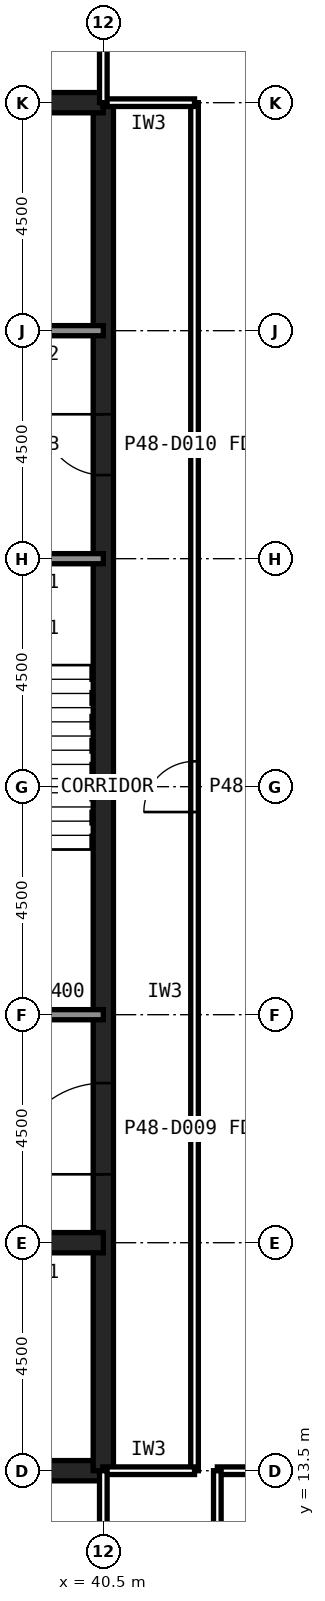
"""IFC4 building model, lengths in metres.
Left out: names, types, materials, properties, quantities, classifications, styles, units other than length and angle.
Written with IfcOpenShell. Run it as: python <this file> out.ifc"""

import sys

from ifc_helpers import new_model, si_unit, direction, frame, frame_2d, origin, place, context, subcontext, project, spatial, rectangle, extrude, element, fill, save


model = new_model("IFC4")
c1 = context("Model", 3, precision=1e-05, world=origin(), true_north=direction((0.0, 1.0)))
c2 = subcontext(c1, "Body", "Model", "MODEL_VIEW")
j1 = project(units=[si_unit("LENGTHUNIT", "METRE"), si_unit("PLANEANGLEUNIT", "RADIAN")], contexts=[c1])
p1 = place(None, origin())
s1 = spatial("IfcSite", under=j1, at=p1, CompositionType="ELEMENT")
p2 = place(p1, origin())
s2 = spatial("IfcBuilding", under=s1, at=p2, CompositionType="ELEMENT")
p3 = place(p2, frame((0.0, 0.0, 205.6)))
s3 = spatial("IfcBuildingStorey", under=s2, at=p3, CompositionType="ELEMENT", Elevation=205.6)
p4 = place(p3, frame((13.5, 13.5, 0.0), z_axis=(0.0, 0.0, 1.0), x_axis=(1.0, 0.0, 0.0)))
e1 = element("IfcWall", 1, at=p4, inside=s3, PredefinedType="SHEAR", context=c2, shape_type="SweptSolid", body=[
    extrude(rectangle(XDim=27.0, YDim=0.4, at=frame_2d((13.5, 0.0))), origin(), (0.0, 0.0, 1.0), 5.0),
])
p5 = place(p3, frame((40.5, 13.5, 0.0), z_axis=(0.0, 0.0, 1.0), x_axis=(0.0, 1.0, 0.0)))
e2 = element("IfcWall", 2, at=p5, inside=s3, PredefinedType="SHEAR", context=c2, shape_type="SweptSolid", body=[
    extrude(rectangle(XDim=27.0, YDim=0.4, at=frame_2d((13.5, 0.0))), origin(), (0.0, 0.0, 1.0), 5.0),
])
p6 = place(p5, frame((5.85, 0.0, 0.0)))
e3 = element("IfcOpeningElement", 3, at=p6, cuts=e2, PredefinedType="OPENING", context=c2, shape_type="SweptSolid", body=[
    extrude(rectangle(XDim=1.8, YDim=2.1, at=frame_2d((0.9, 1.05))), frame((0.0, 0.21, 0.0), z_axis=(0.0, -1.0, 0.0), x_axis=(1.0, 0.0, 0.0)), (0.0, 0.0, 1.0), 0.42),
])
p7 = place(p5, frame((19.65, 0.0, 0.0)))
e4 = element("IfcOpeningElement", 4, at=p7, cuts=e2, PredefinedType="OPENING", context=c2, shape_type="SweptSolid", body=[
    extrude(rectangle(XDim=1.2, YDim=2.1, at=frame_2d((0.6, 1.05))), frame((0.0, 0.21, 0.0), z_axis=(0.0, -1.0, 0.0), x_axis=(1.0, 0.0, 0.0)), (0.0, 0.0, 1.0), 0.42),
])
p8 = place(p3, frame((40.5, 40.5, 0.0), z_axis=(0.0, 0.0, 1.0), x_axis=(-1.0, 0.0, 0.0)))
e5 = element("IfcWall", 5, at=p8, inside=s3, PredefinedType="SHEAR", context=c2, shape_type="SweptSolid", body=[
    extrude(rectangle(XDim=27.0, YDim=0.4, at=frame_2d((13.5, 0.0))), origin(), (0.0, 0.0, 1.0), 5.0),
])
p9 = place(p3, frame((13.5, 18.0, 0.0), z_axis=(0.0, 0.0, 1.0), x_axis=(1.0, 0.0, 0.0)))
e6 = element("IfcWall", 6, at=p9, inside=s3, PredefinedType="SHEAR", context=c2, shape_type="SweptSolid", body=[
    extrude(rectangle(XDim=27.0, YDim=0.4, at=frame_2d((13.5, 0.0))), origin(), (0.0, 0.0, 1.0), 5.0),
])
p10 = place(p9, frame((24.3, 0.0, 0.0)))
e7 = element("IfcOpeningElement", 7, at=p10, cuts=e6, PredefinedType="OPENING", context=c2, shape_type="SweptSolid", body=[
    extrude(rectangle(XDim=0.9, YDim=2.1, at=frame_2d((0.45, 1.05))), frame((0.0, 0.21, 0.0), z_axis=(0.0, -1.0, 0.0), x_axis=(1.0, 0.0, 0.0)), (0.0, 0.0, 1.0), 0.42),
])
p11 = place(p9, frame((5.45, 0.0, 0.0)))
e8 = element("IfcOpeningElement", 8, at=p11, cuts=e6, PredefinedType="OPENING", context=c2, shape_type="SweptSolid", body=[
    extrude(rectangle(XDim=1.1, YDim=2.1, at=frame_2d((0.55, 1.05))), frame((0.0, 0.21, 0.0), z_axis=(0.0, -1.0, 0.0), x_axis=(1.0, 0.0, 0.0)), (0.0, 0.0, 1.0), 0.42),
])
p12 = place(p9, frame((8.45, 0.0, 0.0)))
e9 = element("IfcOpeningElement", 9, at=p12, cuts=e6, PredefinedType="OPENING", context=c2, shape_type="SweptSolid", body=[
    extrude(rectangle(XDim=1.1, YDim=2.1, at=frame_2d((0.55, 1.05))), frame((0.0, 0.21, 0.0), z_axis=(0.0, -1.0, 0.0), x_axis=(1.0, 0.0, 0.0)), (0.0, 0.0, 1.0), 0.42),
])
p13 = place(p9, frame((11.45, 0.0, 0.0)))
e10 = element("IfcOpeningElement", 10, at=p13, cuts=e6, PredefinedType="OPENING", context=c2, shape_type="SweptSolid", body=[
    extrude(rectangle(XDim=1.1, YDim=2.1, at=frame_2d((0.55, 1.05))), frame((0.0, 0.21, 0.0), z_axis=(0.0, -1.0, 0.0), x_axis=(1.0, 0.0, 0.0)), (0.0, 0.0, 1.0), 0.42),
])
p14 = place(p9, frame((14.45, 0.0, 0.0)))
e11 = element("IfcOpeningElement", 11, at=p14, cuts=e6, PredefinedType="OPENING", context=c2, shape_type="SweptSolid", body=[
    extrude(rectangle(XDim=1.1, YDim=2.1, at=frame_2d((0.55, 1.05))), frame((0.0, 0.21, 0.0), z_axis=(0.0, -1.0, 0.0), x_axis=(1.0, 0.0, 0.0)), (0.0, 0.0, 1.0), 0.42),
])
p15 = place(p9, frame((17.45, 0.0, 0.0)))
e12 = element("IfcOpeningElement", 12, at=p15, cuts=e6, PredefinedType="OPENING", context=c2, shape_type="SweptSolid", body=[
    extrude(rectangle(XDim=1.1, YDim=2.1, at=frame_2d((0.55, 1.05))), frame((0.0, 0.21, 0.0), z_axis=(0.0, -1.0, 0.0), x_axis=(1.0, 0.0, 0.0)), (0.0, 0.0, 1.0), 0.42),
])
p16 = place(p9, frame((20.45, 0.0, 0.0)))
e13 = element("IfcOpeningElement", 13, at=p16, cuts=e6, PredefinedType="OPENING", context=c2, shape_type="SweptSolid", body=[
    extrude(rectangle(XDim=1.1, YDim=2.1, at=frame_2d((0.55, 1.05))), frame((0.0, 0.21, 0.0), z_axis=(0.0, -1.0, 0.0), x_axis=(1.0, 0.0, 0.0)), (0.0, 0.0, 1.0), 0.42),
])
p17 = place(p9, frame((1.6, 0.0, 0.0)))
e14 = element("IfcOpeningElement", 14, at=p17, cuts=e6, PredefinedType="OPENING", context=c2, shape_type="SweptSolid", body=[
    extrude(rectangle(XDim=1.3, YDim=2.2, at=frame_2d((0.65, 1.1))), frame((0.0, 0.21, 0.0), z_axis=(0.0, -1.0, 0.0), x_axis=(1.0, 0.0, 0.0)), (0.0, 0.0, 1.0), 0.42),
])
p18 = place(p3, frame((13.5, 36.0, 0.0), z_axis=(0.0, 0.0, 1.0), x_axis=(1.0, 0.0, 0.0)))
e15 = element("IfcWall", 15, at=p18, inside=s3, PredefinedType="SOLIDWALL", context=c2, shape_type="SweptSolid", body=[
    extrude(rectangle(XDim=27.0, YDim=0.2, at=frame_2d((13.5, 0.0))), origin(), (0.0, 0.0, 1.0), 4.84),
])
p19 = place(p18, frame((1.8, 0.0, 0.0)))
e16 = element("IfcOpeningElement", 16, at=p19, cuts=e15, PredefinedType="OPENING", context=c2, shape_type="SweptSolid", body=[
    extrude(rectangle(XDim=0.9, YDim=2.1, at=frame_2d((0.45, 1.05))), frame((0.0, 0.11, 0.0), z_axis=(0.0, -1.0, 0.0), x_axis=(1.0, 0.0, 0.0)), (0.0, 0.0, 1.0), 0.22),
])
p20 = place(p18, frame((5.55, 0.0, 0.0)))
e17 = element("IfcOpeningElement", 17, at=p20, cuts=e15, PredefinedType="OPENING", context=c2, shape_type="SweptSolid", body=[
    extrude(rectangle(XDim=0.9, YDim=2.1, at=frame_2d((0.45, 1.05))), frame((0.0, 0.11, 0.0), z_axis=(0.0, -1.0, 0.0), x_axis=(1.0, 0.0, 0.0)), (0.0, 0.0, 1.0), 0.22),
])
p21 = place(p18, frame((14.35, 0.0, 0.0)))
e18 = element("IfcOpeningElement", 18, at=p21, cuts=e15, PredefinedType="OPENING", context=c2, shape_type="SweptSolid", body=[
    extrude(rectangle(XDim=1.3, YDim=2.2, at=frame_2d((0.65, 1.1))), frame((0.0, 0.11, 0.0), z_axis=(0.0, -1.0, 0.0), x_axis=(1.0, 0.0, 0.0)), (0.0, 0.0, 1.0), 0.22),
])
p22 = place(p18, frame((17.35, 0.0, 0.0)))
e19 = element("IfcOpeningElement", 19, at=p22, cuts=e15, PredefinedType="OPENING", context=c2, shape_type="SweptSolid", body=[
    extrude(rectangle(XDim=1.3, YDim=2.2, at=frame_2d((0.65, 1.1))), frame((0.0, 0.11, 0.0), z_axis=(0.0, -1.0, 0.0), x_axis=(1.0, 0.0, 0.0)), (0.0, 0.0, 1.0), 0.22),
])
p23 = place(p18, frame((20.35, 0.0, 0.0)))
e20 = element("IfcOpeningElement", 20, at=p23, cuts=e15, PredefinedType="OPENING", context=c2, shape_type="SweptSolid", body=[
    extrude(rectangle(XDim=1.3, YDim=2.2, at=frame_2d((0.65, 1.1))), frame((0.0, 0.11, 0.0), z_axis=(0.0, -1.0, 0.0), x_axis=(1.0, 0.0, 0.0)), (0.0, 0.0, 1.0), 0.22),
])
p24 = place(p18, frame((24.1, 0.0, 0.0)))
e21 = element("IfcOpeningElement", 21, at=p24, cuts=e15, PredefinedType="OPENING", context=c2, shape_type="SweptSolid", body=[
    extrude(rectangle(XDim=1.3, YDim=2.2, at=frame_2d((0.65, 1.1))), frame((0.0, 0.11, 0.0), z_axis=(0.0, -1.0, 0.0), x_axis=(1.0, 0.0, 0.0)), (0.0, 0.0, 1.0), 0.22),
])
p25 = place(p3, frame((13.5, 22.5, 0.0), z_axis=(0.0, 0.0, 1.0), x_axis=(1.0, 0.0, 0.0)))
e22 = element("IfcWall", 22, at=p25, inside=s3, PredefinedType="SOLIDWALL", context=c2, shape_type="SweptSolid", body=[
    extrude(rectangle(XDim=27.0, YDim=0.2, at=frame_2d((13.5, 0.0))), origin(), (0.0, 0.0, 1.0), 4.84),
])
p26 = place(p25, frame((1.65, 0.0, 0.0)))
e23 = element("IfcOpeningElement", 23, at=p26, cuts=e22, PredefinedType="OPENING", context=c2, shape_type="SweptSolid", body=[
    extrude(rectangle(XDim=1.2, YDim=2.1, at=frame_2d((0.6, 1.05))), frame((0.0, 0.11, 0.0), z_axis=(0.0, -1.0, 0.0), x_axis=(1.0, 0.0, 0.0)), (0.0, 0.0, 1.0), 0.22),
])
p27 = place(p25, frame((6.025, 0.0, 0.0)))
e24 = element("IfcOpeningElement", 24, at=p27, cuts=e22, PredefinedType="OPENING", context=c2, shape_type="SweptSolid", body=[
    extrude(rectangle(XDim=1.0, YDim=2.1, at=frame_2d((0.5, 1.05))), frame((0.0, 0.11, 0.0), z_axis=(0.0, -1.0, 0.0), x_axis=(1.0, 0.0, 0.0)), (0.0, 0.0, 1.0), 0.22),
])
p28 = place(p25, frame((10.525, 0.0, 0.0)))
e25 = element("IfcOpeningElement", 25, at=p28, cuts=e22, PredefinedType="OPENING", context=c2, shape_type="SweptSolid", body=[
    extrude(rectangle(XDim=1.0, YDim=2.1, at=frame_2d((0.5, 1.05))), frame((0.0, 0.11, 0.0), z_axis=(0.0, -1.0, 0.0), x_axis=(1.0, 0.0, 0.0)), (0.0, 0.0, 1.0), 0.22),
])
p29 = place(p25, frame((19.75, 0.0, 0.0)))
e26 = element("IfcOpeningElement", 26, at=p29, cuts=e22, PredefinedType="OPENING", context=c2, shape_type="SweptSolid", body=[
    extrude(rectangle(XDim=1.0, YDim=2.1, at=frame_2d((0.5, 1.05))), frame((0.0, 0.11, 0.0), z_axis=(0.0, -1.0, 0.0), x_axis=(1.0, 0.0, 0.0)), (0.0, 0.0, 1.0), 0.22),
])
p30 = place(p25, frame((15.05, 0.0, 0.0)))
e27 = element("IfcOpeningElement", 27, at=p30, cuts=e22, PredefinedType="OPENING", context=c2, shape_type="SweptSolid", body=[
    extrude(rectangle(XDim=1.4, YDim=2.4, at=frame_2d((0.7, 1.2))), frame((0.0, 0.11, 0.0), z_axis=(0.0, -1.0, 0.0), x_axis=(1.0, 0.0, 0.0)), (0.0, 0.0, 1.0), 0.22),
])
p31 = place(p3, frame((13.5, 31.5, 0.0), z_axis=(0.0, 0.0, 1.0), x_axis=(1.0, 0.0, 0.0)))
e28 = element("IfcWall", 28, at=p31, inside=s3, PredefinedType="SOLIDWALL", context=c2, shape_type="SweptSolid", body=[
    extrude(rectangle(XDim=27.0, YDim=0.2, at=frame_2d((13.5, 0.0))), origin(), (0.0, 0.0, 1.0), 4.84),
])
p32 = place(p31, frame((24.15, 0.0, 0.0)))
e29 = element("IfcOpeningElement", 29, at=p32, cuts=e28, PredefinedType="OPENING", context=c2, shape_type="SweptSolid", body=[
    extrude(rectangle(XDim=1.2, YDim=2.1, at=frame_2d((0.6, 1.05))), frame((0.0, 0.11, 0.0), z_axis=(0.0, -1.0, 0.0), x_axis=(1.0, 0.0, 0.0)), (0.0, 0.0, 1.0), 0.22),
])
p33 = place(p31, frame((15.3, 0.0, 0.0)))
e30 = element("IfcOpeningElement", 30, at=p33, cuts=e28, PredefinedType="OPENING", context=c2, shape_type="SweptSolid", body=[
    extrude(rectangle(XDim=0.9, YDim=2.1, at=frame_2d((0.45, 1.05))), frame((0.0, 0.11, 0.0), z_axis=(0.0, -1.0, 0.0), x_axis=(1.0, 0.0, 0.0)), (0.0, 0.0, 1.0), 0.22),
])
p34 = place(p31, frame((19.8, 0.0, 0.0)))
e31 = element("IfcOpeningElement", 31, at=p34, cuts=e28, PredefinedType="OPENING", context=c2, shape_type="SweptSolid", body=[
    extrude(rectangle(XDim=0.9, YDim=2.1, at=frame_2d((0.45, 1.05))), frame((0.0, 0.11, 0.0), z_axis=(0.0, -1.0, 0.0), x_axis=(1.0, 0.0, 0.0)), (0.0, 0.0, 1.0), 0.22),
])
p35 = place(p3, frame((42.3, 13.5, 0.0), z_axis=(0.0, 0.0, 1.0), x_axis=(0.0, 1.0, 0.0)))
e32 = element("IfcWall", 32, at=p35, inside=s3, PredefinedType="PARTITIONING", context=c2, shape_type="SweptSolid", body=[
    extrude(rectangle(XDim=27.0, YDim=0.15, at=frame_2d((13.5, 0.0))), origin(), (0.0, 0.0, 1.0), 4.84),
])
p36 = place(p35, frame((13.0, 0.0, 0.0)))
e33 = element("IfcOpeningElement", 33, at=p36, cuts=e32, PredefinedType="OPENING", context=c2, shape_type="SweptSolid", body=[
    extrude(rectangle(XDim=1.0, YDim=2.1, at=frame_2d((0.5, 1.05))), frame((0.0, 0.085, 0.0), z_axis=(0.0, -1.0, 0.0), x_axis=(1.0, 0.0, 0.0)), (0.0, 0.0, 1.0), 0.17),
])
for number, where, z_axis, x_axis in (
    (34, (40.49, 13.5, 0.0), (0.0, 0.0, 1.0), (1.0, 0.0, 0.0)),
    (35, (42.3, 40.5, 0.0), (0.0, 0.0, 1.0), (-1.0, 0.0, 0.0)),
):
    element("IfcWall", number, at=place(p3, frame(where, z_axis=z_axis, x_axis=x_axis)), inside=s3, PredefinedType="PARTITIONING", context=c2, shape_type="SweptSolid", body=[
        extrude(rectangle(XDim=1.81, YDim=0.15, at=frame_2d((0.905, 0.0))), origin(), (0.0, 0.0, 1.0), 3.989),
    ])
p37 = place(p3, frame((49.09, 13.5, 0.0), z_axis=(0.0, 0.0, 1.0), x_axis=(-1.0, 0.0, 0.0)))
e36 = element("IfcWall", 36, at=p37, inside=s3, PredefinedType="PARTITIONING", context=c2, shape_type="SweptSolid", body=[
    extrude(rectangle(XDim=6.34, YDim=0.15, at=frame_2d((3.17, 0.0))), origin(), (0.0, 0.0, 1.0), 3.989),
])
p38 = place(p3, frame((42.75, 13.5, 0.0), z_axis=(0.0, 0.0, 1.0), x_axis=(0.0, -1.0, 0.0)))
e37 = element("IfcWall", 37, at=p38, inside=s3, PredefinedType="PARTITIONING", context=c2, shape_type="SweptSolid", body=[
    extrude(rectangle(XDim=7.485, YDim=0.15, at=frame_2d((3.743, 0.0))), origin(), (0.0, 0.0, 1.0), 4.84),
])
p39 = place(p38, frame((2.868, 0.0, 0.0)))
e38 = element("IfcOpeningElement", 38, at=p39, cuts=e37, PredefinedType="OPENING", context=c2, shape_type="SweptSolid", body=[
    extrude(rectangle(XDim=1.0, YDim=2.1, at=frame_2d((0.5, 1.05))), frame((0.0, 0.085, 0.0), z_axis=(0.0, -1.0, 0.0), x_axis=(1.0, 0.0, 0.0)), (0.0, 0.0, 1.0), 0.17),
])
p40 = place(p3, frame((40.5, 49.08, 0.0), z_axis=(0.0, 0.0, 1.0), x_axis=(0.0, -1.0, 0.0)))
e39 = element("IfcWall", 39, at=p40, inside=s3, PredefinedType="PARTITIONING", context=c2, shape_type="SweptSolid", body=[
    extrude(rectangle(XDim=8.58, YDim=0.15, at=frame_2d((4.29, 0.0))), origin(), (0.0, 0.0, 1.0), 3.989),
])
p41 = place(p40, frame((3.79, 0.0, 0.0)))
e40 = element("IfcOpeningElement", 40, at=p41, cuts=e39, PredefinedType="OPENING", context=c2, shape_type="SweptSolid", body=[
    extrude(rectangle(XDim=1.0, YDim=2.1, at=frame_2d((0.5, 1.05))), frame((0.0, 0.085, 0.0), z_axis=(0.0, -1.0, 0.0), x_axis=(1.0, 0.0, 0.0)), (0.0, 0.0, 1.0), 0.17),
])
p42 = place(p3, frame((40.5, 4.92, 0.0), z_axis=(0.0, 0.0, 1.0), x_axis=(0.0, 1.0, 0.0)))
e41 = element("IfcWall", 41, at=p42, inside=s3, PredefinedType="PARTITIONING", context=c2, shape_type="SweptSolid", body=[
    extrude(rectangle(XDim=8.58, YDim=0.15, at=frame_2d((4.29, 0.0))), origin(), (0.0, 0.0, 1.0), 3.989),
])
p43 = place(p42, frame((3.79, 0.0, 0.0)))
e42 = element("IfcOpeningElement", 42, at=p43, cuts=e41, PredefinedType="OPENING", context=c2, shape_type="SweptSolid", body=[
    extrude(rectangle(XDim=1.0, YDim=2.1, at=frame_2d((0.5, 1.05))), frame((0.0, 0.085, 0.0), z_axis=(0.0, -1.0, 0.0), x_axis=(1.0, 0.0, 0.0)), (0.0, 0.0, 1.0), 0.17),
])
p44 = place(p6, origin())
e43 = element("IfcDoor", 43, at=p44, inside=s3, OperationType="SINGLE_SWING_LEFT", PredefinedType="DOOR", context=c2, shape_type="SweptSolid", body=[
    extrude(rectangle(XDim=1.8, YDim=2.1, at=frame_2d((0.9, 1.05))), frame((0.0, 0.025, 0.0), z_axis=(0.0, -1.0, 0.0), x_axis=(1.0, 0.0, 0.0)), (0.0, 0.0, 1.0), 0.05),
])
fill(e3, e43)
p45 = place(p7, origin())
e44 = element("IfcDoor", 44, at=p45, inside=s3, OperationType="SINGLE_SWING_RIGHT", PredefinedType="DOOR", context=c2, shape_type="SweptSolid", body=[
    extrude(rectangle(XDim=1.2, YDim=2.1, at=frame_2d((0.6, 1.05))), frame((0.0, 0.025, 0.0), z_axis=(0.0, -1.0, 0.0), x_axis=(1.0, 0.0, 0.0)), (0.0, 0.0, 1.0), 0.05),
])
fill(e4, e44)
p46 = place(p36, origin())
e45 = element("IfcDoor", 45, at=p46, inside=s3, OperationType="SINGLE_SWING_LEFT", PredefinedType="DOOR", context=c2, shape_type="SweptSolid", body=[
    extrude(rectangle(XDim=1.0, YDim=2.1, at=frame_2d((0.5, 1.05))), frame((0.0, 0.025, 0.0), z_axis=(0.0, -1.0, 0.0), x_axis=(1.0, 0.0, 0.0)), (0.0, 0.0, 1.0), 0.05),
])
fill(e33, e45)
save(model, sys.argv[1])
